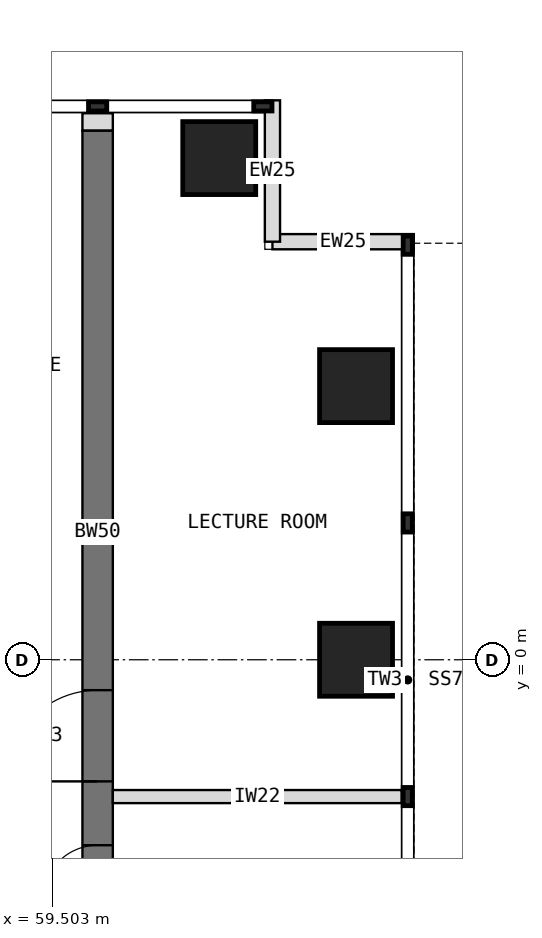
"""IFC4 building model, lengths in metres.
Left out: names, types, materials, properties, quantities, classifications, styles, units other than length and angle.
Written with IfcOpenShell. Run it as: python <this file> out.ifc"""

import sys

from ifc_helpers import new_model, si_unit, direction, frame, frame_2d, origin, origin_2d, place, context, subcontext, project, spatial, rectangle, extrude, element, fill, save


model = new_model("IFC4")
c1 = context("Model", 3, precision=1e-05, world=origin(), true_north=direction((0.0, 1.0)))
c2 = subcontext(c1, "Body", "Model", "MODEL_VIEW")
j1 = project(units=[si_unit("LENGTHUNIT", "METRE"), si_unit("PLANEANGLEUNIT", "RADIAN")], contexts=[c1])
p1 = place(None, origin())
s1 = spatial("IfcSite", under=j1, at=p1, CompositionType="ELEMENT")
p2 = place(p1, origin())
s2 = spatial("IfcBuilding", under=s1, at=p2, CompositionType="ELEMENT")
p3 = place(p2, frame((0.0, 0.0, 174.5)))
s3 = spatial("IfcBuildingStorey", under=s2, at=p3, CompositionType="ELEMENT", Elevation=174.5)
p4 = place(p3, frame((60.25, -4.5, 0.0), z_axis=(0.0, 0.0, 1.0), x_axis=(0.0, 1.0, 0.0)))
e1 = element("IfcWall", 1, at=p4, inside=s3, PredefinedType="SHEAR", context=c2, shape_type="SweptSolid", body=[
    extrude(rectangle(XDim=13.2, YDim=0.5, at=frame_2d((6.6, 0.0))), origin(), (0.0, 0.0, 1.0), 4.0),
])
p5 = place(p4, frame((0.55, 0.0, 0.0)))
e2 = element("IfcOpeningElement", 2, at=p5, cuts=e1, PredefinedType="OPENING", context=c2, shape_type="SweptSolid", body=[
    extrude(rectangle(XDim=0.9, YDim=2.1, at=frame_2d((0.45, 1.05))), frame((0.0, 0.26, 0.0), z_axis=(0.0, -1.0, 0.0), x_axis=(1.0, 0.0, 0.0)), (0.0, 0.0, 1.0), 0.52),
])
p6 = place(p4, frame((2.5, 0.0, 0.0)))
e3 = element("IfcOpeningElement", 3, at=p6, cuts=e1, PredefinedType="OPENING", context=c2, shape_type="SweptSolid", body=[
    extrude(rectangle(XDim=1.5, YDim=2.1, at=frame_2d((0.75, 1.05))), frame((0.0, 0.26, 0.0), z_axis=(0.0, -1.0, 0.0), x_axis=(1.0, 0.0, 0.0)), (0.0, 0.0, 1.0), 0.52),
])
for number, where, z_axis, x_axis in (
    (4, (64.5, 0.0, 0.0), (0.0, 0.0, 1.0), (1.0, 0.0, 0.0)),
    (5, (64.5, 4.5, 0.0), (0.0, 0.0, 1.0), (1.0, 0.0, 0.0)),
    (6, (62.25, 8.25, 0.0), (0.0, 0.0, 1.0), (1.0, 0.0, 0.0)),
):
    element("IfcColumn", number, at=place(p3, frame(where, z_axis=z_axis, x_axis=x_axis)), inside=s3, PredefinedType="COLUMN", context=c2, shape_type="SweptSolid", body=[
        extrude(rectangle(XDim=1.2, YDim=1.2, at=origin_2d()), origin(), (0.0, 0.0, 1.0), 4.0),
    ])
for number, where, z_axis, x_axis in (
    (7, (65.45, 6.875, 0.0), (0.0, 0.0, 1.0), (-1.0, 0.0, 0.0)),
    (8, (63.125, 6.875, 0.0), (0.0, 0.0, 1.0), (0.0, 1.0, 0.0)),
):
    element("IfcWall", number, at=place(p3, frame(where, z_axis=z_axis, x_axis=x_axis)), inside=s3, PredefinedType="STANDARD", context=c2, shape_type="SweptSolid", body=[
        extrude(rectangle(XDim=2.325, YDim=0.25, at=frame_2d((1.163, 0.0))), origin(), (0.0, 0.0, 1.0), 3.8),
    ])
p7 = place(p3, frame((60.25, 8.7, 0.0), z_axis=(0.0, 0.0, 1.0), x_axis=(0.0, 1.0, 0.0)))
e9 = element("IfcWall", 9, at=p7, inside=s3, PredefinedType="PARTITIONING", context=c2, shape_type="SweptSolid", body=[
    extrude(rectangle(XDim=0.288, YDim=0.5, at=frame_2d((0.144, 0.0))), origin(), (0.0, 0.0, 1.0), 3.8),
])
p8 = place(p3, frame((60.5, -2.25, 0.0), z_axis=(0.0, 0.0, 1.0), x_axis=(1.0, 0.0, 0.0)))
e10 = element("IfcWall", 10, at=p8, inside=s3, PredefinedType="PARTITIONING", context=c2, shape_type="SweptSolid", body=[
    extrude(rectangle(XDim=4.75, YDim=0.215, at=frame_2d((2.375, 0.0))), origin(), (0.0, 0.0, 1.0), 3.8),
])
p9 = place(p5, origin())
e11 = element("IfcDoor", 11, at=p9, inside=s3, OperationType="SINGLE_SWING_LEFT", PredefinedType="DOOR", context=c2, shape_type="SweptSolid", body=[
    extrude(rectangle(XDim=0.9, YDim=2.1, at=frame_2d((0.45, 1.05))), frame((0.0, 0.025, 0.0), z_axis=(0.0, -1.0, 0.0), x_axis=(1.0, 0.0, 0.0)), (0.0, 0.0, 1.0), 0.05),
])
fill(e2, e11)
p10 = place(p6, origin())
e12 = element("IfcDoor", 12, at=p10, inside=s3, OperationType="DOUBLE_DOOR_SINGLE_SWING", PredefinedType="DOOR", context=c2, shape_type="SweptSolid", body=[
    extrude(rectangle(XDim=1.5, YDim=2.1, at=frame_2d((0.75, 1.05))), frame((0.0, 0.025, 0.0), z_axis=(0.0, -1.0, 0.0), x_axis=(1.0, 0.0, 0.0)), (0.0, 0.0, 1.0), 0.05),
])
fill(e3, e12)
save(model, sys.argv[1])
